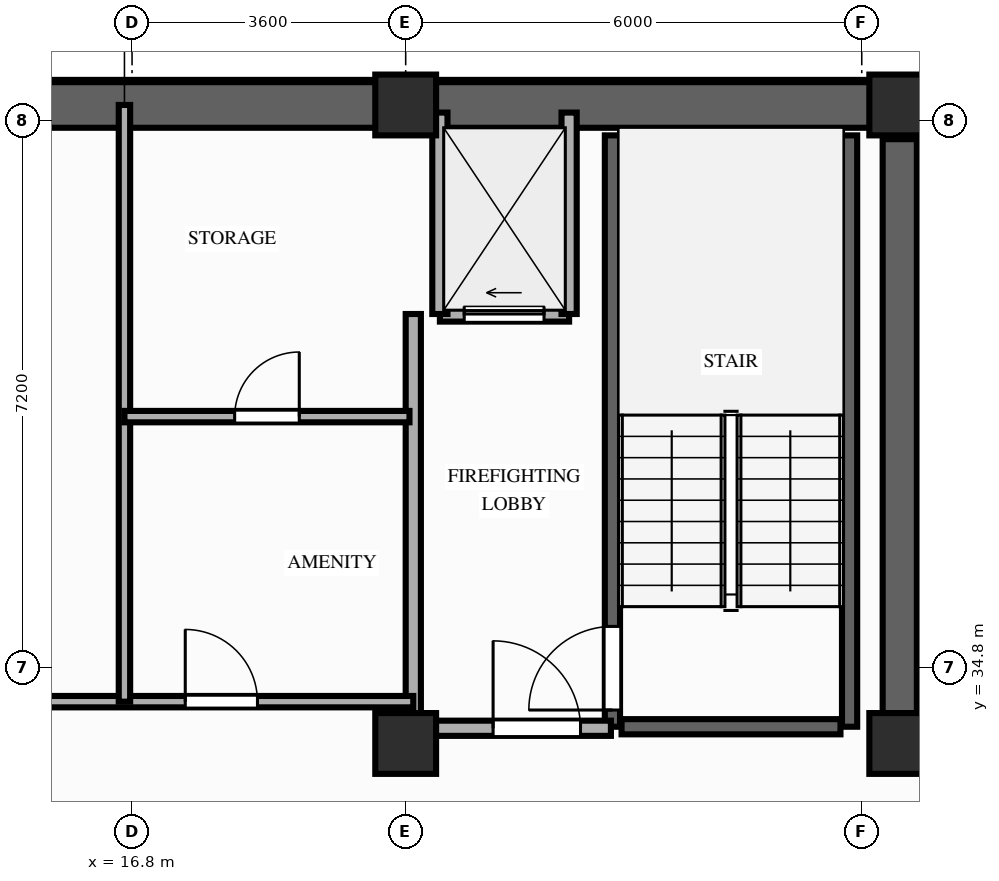
"""IFC4 building model, lengths in metres.
Left out: names, types, materials, properties, quantities, classifications, styles, units other than length and angle.
Written with IfcOpenShell. Run it as: python <this file> out.ifc"""

import sys

from ifc_helpers import new_model, si_unit, direction, frame, frame_2d, origin, origin_2d, place, context, subcontext, project, spatial, rectangle, extrude, element, fill, save


model = new_model("IFC4")
c1 = context("Model", 3, precision=1e-05, world=origin(), true_north=direction((0.0, 1.0)))
c2 = subcontext(c1, "Body", "Model", "MODEL_VIEW")
j1 = project(units=[si_unit("LENGTHUNIT", "METRE"), si_unit("PLANEANGLEUNIT", "RADIAN")], contexts=[c1])
p1 = place(None, origin())
s1 = spatial("IfcSite", under=j1, at=p1, CompositionType="ELEMENT")
p2 = place(p1, origin())
s2 = spatial("IfcBuilding", under=s1, at=p2, CompositionType="ELEMENT")
p3 = place(p2, frame((0.0, 0.0, 228.0)))
s3 = spatial("IfcBuildingStorey", under=s2, at=p3, CompositionType="ELEMENT", Elevation=228.0)
for number, where, z_axis, x_axis in (
    (1, (20.4, 33.8, 0.0), (0.0, 0.0, 1.0), (1.0, 0.0, 0.0)),
    (2, (26.9, 33.8, 0.0), (0.0, 0.0, 1.0), (1.0, 0.0, 0.0)),
    (3, (20.4, 42.2, 0.0), (0.0, 0.0, 1.0), (1.0, 0.0, 0.0)),
    (4, (26.9, 42.2, 0.0), (0.0, 0.0, 1.0), (1.0, 0.0, 0.0)),
):
    element("IfcColumn", number, at=place(p3, frame(where, z_axis=z_axis, x_axis=x_axis)), inside=s3, PredefinedType="COLUMN", context=c2, shape_type="SweptSolid", body=[
        extrude(rectangle(XDim=0.8, YDim=0.8, at=origin_2d()), origin(), (0.0, 0.0, 1.0), 3.2),
    ])
p4 = place(p3, frame((6.45, 42.2, 0.0), z_axis=(0.0, 0.0, 1.0), x_axis=(1.0, 0.0, 0.0)))
e5 = element("IfcWall", 5, at=p4, inside=s3, PredefinedType="SHEAR", context=c2, shape_type="SweptSolid", body=[
    extrude(rectangle(XDim=20.45, YDim=0.6, at=frame_2d((10.225, 0.0))), origin(), (0.0, 0.0, 1.0), 3.02),
])
p5 = place(p3, frame((26.9, 33.8, 0.0), z_axis=(0.0, 0.0, 1.0), x_axis=(0.0, 1.0, 0.0)))
e6 = element("IfcWall", 6, at=p5, inside=s3, PredefinedType="SHEAR", context=c2, shape_type="SweptSolid", body=[
    extrude(rectangle(XDim=7.95, YDim=0.45, at=frame_2d((3.975, 0.0))), origin(), (0.0, 0.0, 1.0), 3.02),
])
p6 = place(p3, frame((23.12, 34.02, 0.0), z_axis=(0.0, 0.0, 1.0), x_axis=(0.0, 1.0, 0.0)))
e7 = element("IfcWall", 7, at=p6, inside=s3, PredefinedType="SHEAR", context=c2, shape_type="SweptSolid", body=[
    extrude(rectangle(XDim=7.78, YDim=0.2, at=frame_2d((3.89, 0.0))), origin(), (0.0, 0.0, 1.0), 3.02),
])
p7 = place(p6, frame((0.22, 0.0, 0.0)))
e8 = element("IfcOpeningElement", 8, at=p7, cuts=e7, PredefinedType="OPENING", context=c2, shape_type="SweptSolid", body=[
    extrude(rectangle(XDim=1.1, YDim=2.15, at=frame_2d((0.55, 1.075))), frame((0.0, 0.11, 0.0), z_axis=(0.0, -1.0, 0.0), x_axis=(1.0, 0.0, 0.0)), (0.0, 0.0, 1.0), 0.22),
])
p8 = place(p3, frame((26.24, 34.02, 0.0), z_axis=(0.0, 0.0, 1.0), x_axis=(0.0, 1.0, 0.0)))
e9 = element("IfcWall", 9, at=p8, inside=s3, PredefinedType="SHEAR", context=c2, shape_type="SweptSolid", body=[
    extrude(rectangle(XDim=7.78, YDim=0.2, at=frame_2d((3.89, 0.0))), origin(), (0.0, 0.0, 1.0), 3.02),
])
p9 = place(p3, frame((23.24, 34.02, 0.0), z_axis=(0.0, 0.0, 1.0), x_axis=(1.0, 0.0, 0.0)))
e10 = element("IfcWall", 10, at=p9, inside=s3, PredefinedType="SHEAR", context=c2, shape_type="SweptSolid", body=[
    extrude(rectangle(XDim=2.88, YDim=0.2, at=frame_2d((1.44, 0.0))), origin(), (0.0, 0.0, 1.0), 3.02),
])
p10 = place(p3, frame((20.85, 39.45, 0.0), z_axis=(0.0, 0.0, 1.0), x_axis=(1.0, 0.0, 0.0)))
e11 = element("IfcWall", 11, at=p10, inside=s3, PredefinedType="MOVABLE", context=c2, shape_type="SweptSolid", body=[
    extrude(rectangle(XDim=1.7, YDim=0.2, at=frame_2d((0.85, 0.0))), origin(), (0.0, 0.0, 1.0), 3.02),
])
p11 = place(p10, frame((0.32, 0.0, 0.0)))
e12 = element("IfcOpeningElement", 12, at=p11, cuts=e11, PredefinedType="OPENING", context=c2, shape_type="SweptSolid", body=[
    extrude(rectangle(XDim=1.05, YDim=2.15, at=frame_2d((0.525, 1.075))), frame((0.0, 0.11, 0.0), z_axis=(0.0, -1.0, 0.0), x_axis=(1.0, 0.0, 0.0)), (0.0, 0.0, 1.0), 0.22),
])
for number, where, z_axis, x_axis in (
    (13, (20.85, 39.45, 0.0), (0.0, 0.0, 1.0), (0.0, 1.0, 0.0)),
    (14, (22.55, 39.45, 0.0), (0.0, 0.0, 1.0), (0.0, 1.0, 0.0)),
):
    element("IfcWall", number, at=place(p3, frame(where, z_axis=z_axis, x_axis=x_axis)), inside=s3, PredefinedType="MOVABLE", context=c2, shape_type="SweptSolid", body=[
        extrude(rectangle(XDim=2.65, YDim=0.2, at=frame_2d((1.325, 0.0))), origin(), (0.0, 0.0, 1.0), 2.51),
    ])
p12 = place(p3, frame((20.5, 34.0, 0.0), z_axis=(0.0, 0.0, 1.0), x_axis=(0.0, 1.0, 0.0)))
e15 = element("IfcWall", 15, at=p12, inside=s3, PredefinedType="PARTITIONING", context=c2, shape_type="SweptSolid", body=[
    extrude(rectangle(XDim=5.45, YDim=0.2, at=frame_2d((2.725, 0.0))), origin(), (0.0, 0.0, 1.0), 2.51),
])
p13 = place(p3, frame((20.5, 34.0, 0.0), z_axis=(0.0, 0.0, 1.0), x_axis=(1.0, 0.0, 0.0)))
e16 = element("IfcWall", 16, at=p13, inside=s3, PredefinedType="PARTITIONING", context=c2, shape_type="SweptSolid", body=[
    extrude(rectangle(XDim=2.6, YDim=0.2, at=frame_2d((1.3, 0.0))), origin(), (0.0, 0.0, 1.0), 2.51),
])
p14 = place(p13, frame((1.05, 0.0, 0.0)))
e17 = element("IfcOpeningElement", 17, at=p14, cuts=e16, PredefinedType="OPENING", context=c2, shape_type="SweptSolid", body=[
    extrude(rectangle(XDim=1.15, YDim=2.15, at=frame_2d((0.575, 1.075))), frame((0.0, 0.11, 0.0), z_axis=(0.0, -1.0, 0.0), x_axis=(1.0, 0.0, 0.0)), (0.0, 0.0, 1.0), 0.22),
])
p15 = place(p3, frame((12.9, 34.35, 0.0), z_axis=(0.0, 0.0, 1.0), x_axis=(1.0, 0.0, 0.0)))
e18 = element("IfcWall", 18, at=p15, inside=s3, PredefinedType="PARTITIONING", context=c2, shape_type="SweptSolid", body=[
    extrude(rectangle(XDim=7.6, YDim=0.15, at=frame_2d((3.8, 0.0))), origin(), (0.0, 0.0, 1.0), 3.02),
])
p16 = place(p15, frame((1.4, 0.0, 0.0)))
e19 = element("IfcOpeningElement", 19, at=p16, cuts=e18, PredefinedType="OPENING", context=c2, shape_type="SweptSolid", body=[
    extrude(rectangle(XDim=0.95, YDim=2.15, at=frame_2d((0.475, 1.075))), frame((0.0, 0.085, 0.0), z_axis=(0.0, -1.0, 0.0), x_axis=(1.0, 0.0, 0.0)), (0.0, 0.0, 1.0), 0.17),
])
p17 = place(p15, frame((4.6, 0.0, 0.0)))
e20 = element("IfcOpeningElement", 20, at=p17, cuts=e18, PredefinedType="OPENING", context=c2, shape_type="SweptSolid", body=[
    extrude(rectangle(XDim=0.95, YDim=2.15, at=frame_2d((0.475, 1.075))), frame((0.0, 0.085, 0.0), z_axis=(0.0, -1.0, 0.0), x_axis=(1.0, 0.0, 0.0)), (0.0, 0.0, 1.0), 0.17),
])
p18 = place(p3, frame((16.7, 34.35, 0.0), z_axis=(0.0, 0.0, 1.0), x_axis=(0.0, 1.0, 0.0)))
e21 = element("IfcWall", 21, at=p18, inside=s3, PredefinedType="PARTITIONING", context=c2, shape_type="SweptSolid", body=[
    extrude(rectangle(XDim=7.85, YDim=0.15, at=frame_2d((3.925, 0.0))), origin(), (0.0, 0.0, 1.0), 2.51),
])
p19 = place(p3, frame((16.7, 38.1, 0.0), z_axis=(0.0, 0.0, 1.0), x_axis=(1.0, 0.0, 0.0)))
e22 = element("IfcWall", 22, at=p19, inside=s3, PredefinedType="PARTITIONING", context=c2, shape_type="SweptSolid", body=[
    extrude(rectangle(XDim=3.75, YDim=0.15, at=frame_2d((1.875, 0.0))), origin(), (0.0, 0.0, 1.0), 3.02),
])
p20 = place(p19, frame((1.45, 0.0, 0.0)))
e23 = element("IfcOpeningElement", 23, at=p20, cuts=e22, PredefinedType="OPENING", context=c2, shape_type="SweptSolid", body=[
    extrude(rectangle(XDim=0.85, YDim=2.05, at=frame_2d((0.425, 1.025))), frame((0.0, 0.085, 0.0), z_axis=(0.0, -1.0, 0.0), x_axis=(1.0, 0.0, 0.0)), (0.0, 0.0, 1.0), 0.17),
])
p21 = place(p7, origin())
e24 = element("IfcDoor", 24, at=p21, inside=s3, OperationType="SINGLE_SWING_LEFT", PredefinedType="DOOR", context=c2, shape_type="SweptSolid", body=[
    extrude(rectangle(XDim=1.1, YDim=2.15, at=frame_2d((0.55, 1.075))), frame((0.0, 0.025, 0.0), z_axis=(0.0, -1.0, 0.0), x_axis=(1.0, 0.0, 0.0)), (0.0, 0.0, 1.0), 0.05),
])
fill(e8, e24)
p22 = place(p11, origin())
e25 = element("IfcDoor", 25, at=p22, inside=s3, OperationType="SLIDING_TO_LEFT", PredefinedType="DOOR", context=c2, shape_type="SweptSolid", body=[
    extrude(rectangle(XDim=1.05, YDim=2.15, at=frame_2d((0.525, 1.075))), frame((0.0, 0.025, 0.0), z_axis=(0.0, -1.0, 0.0), x_axis=(1.0, 0.0, 0.0)), (0.0, 0.0, 1.0), 0.05),
])
fill(e12, e25)
p23 = place(p14, origin())
e26 = element("IfcDoor", 26, at=p23, inside=s3, OperationType="SINGLE_SWING_LEFT", PredefinedType="DOOR", context=c2, shape_type="SweptSolid", body=[
    extrude(rectangle(XDim=1.15, YDim=2.15, at=frame_2d((0.575, 1.075))), frame((0.0, 0.025, 0.0), z_axis=(0.0, -1.0, 0.0), x_axis=(1.0, 0.0, 0.0)), (0.0, 0.0, 1.0), 0.05),
])
fill(e17, e26)
p24 = place(p17, origin())
e27 = element("IfcDoor", 27, at=p24, inside=s3, OperationType="SINGLE_SWING_LEFT", PredefinedType="DOOR", context=c2, shape_type="SweptSolid", body=[
    extrude(rectangle(XDim=0.95, YDim=2.15, at=frame_2d((0.475, 1.075))), frame((0.0, 0.025, 0.0), z_axis=(0.0, -1.0, 0.0), x_axis=(1.0, 0.0, 0.0)), (0.0, 0.0, 1.0), 0.05),
])
fill(e20, e27)
p25 = place(p20, origin())
e28 = element("IfcDoor", 28, at=p25, inside=s3, OperationType="SINGLE_SWING_RIGHT", PredefinedType="DOOR", context=c2, shape_type="SweptSolid", body=[
    extrude(rectangle(XDim=0.85, YDim=2.05, at=frame_2d((0.425, 1.025))), frame((0.0, 0.025, 0.0), z_axis=(0.0, -1.0, 0.0), x_axis=(1.0, 0.0, 0.0)), (0.0, 0.0, 1.0), 0.05),
])
fill(e23, e28)
save(model, sys.argv[1])
